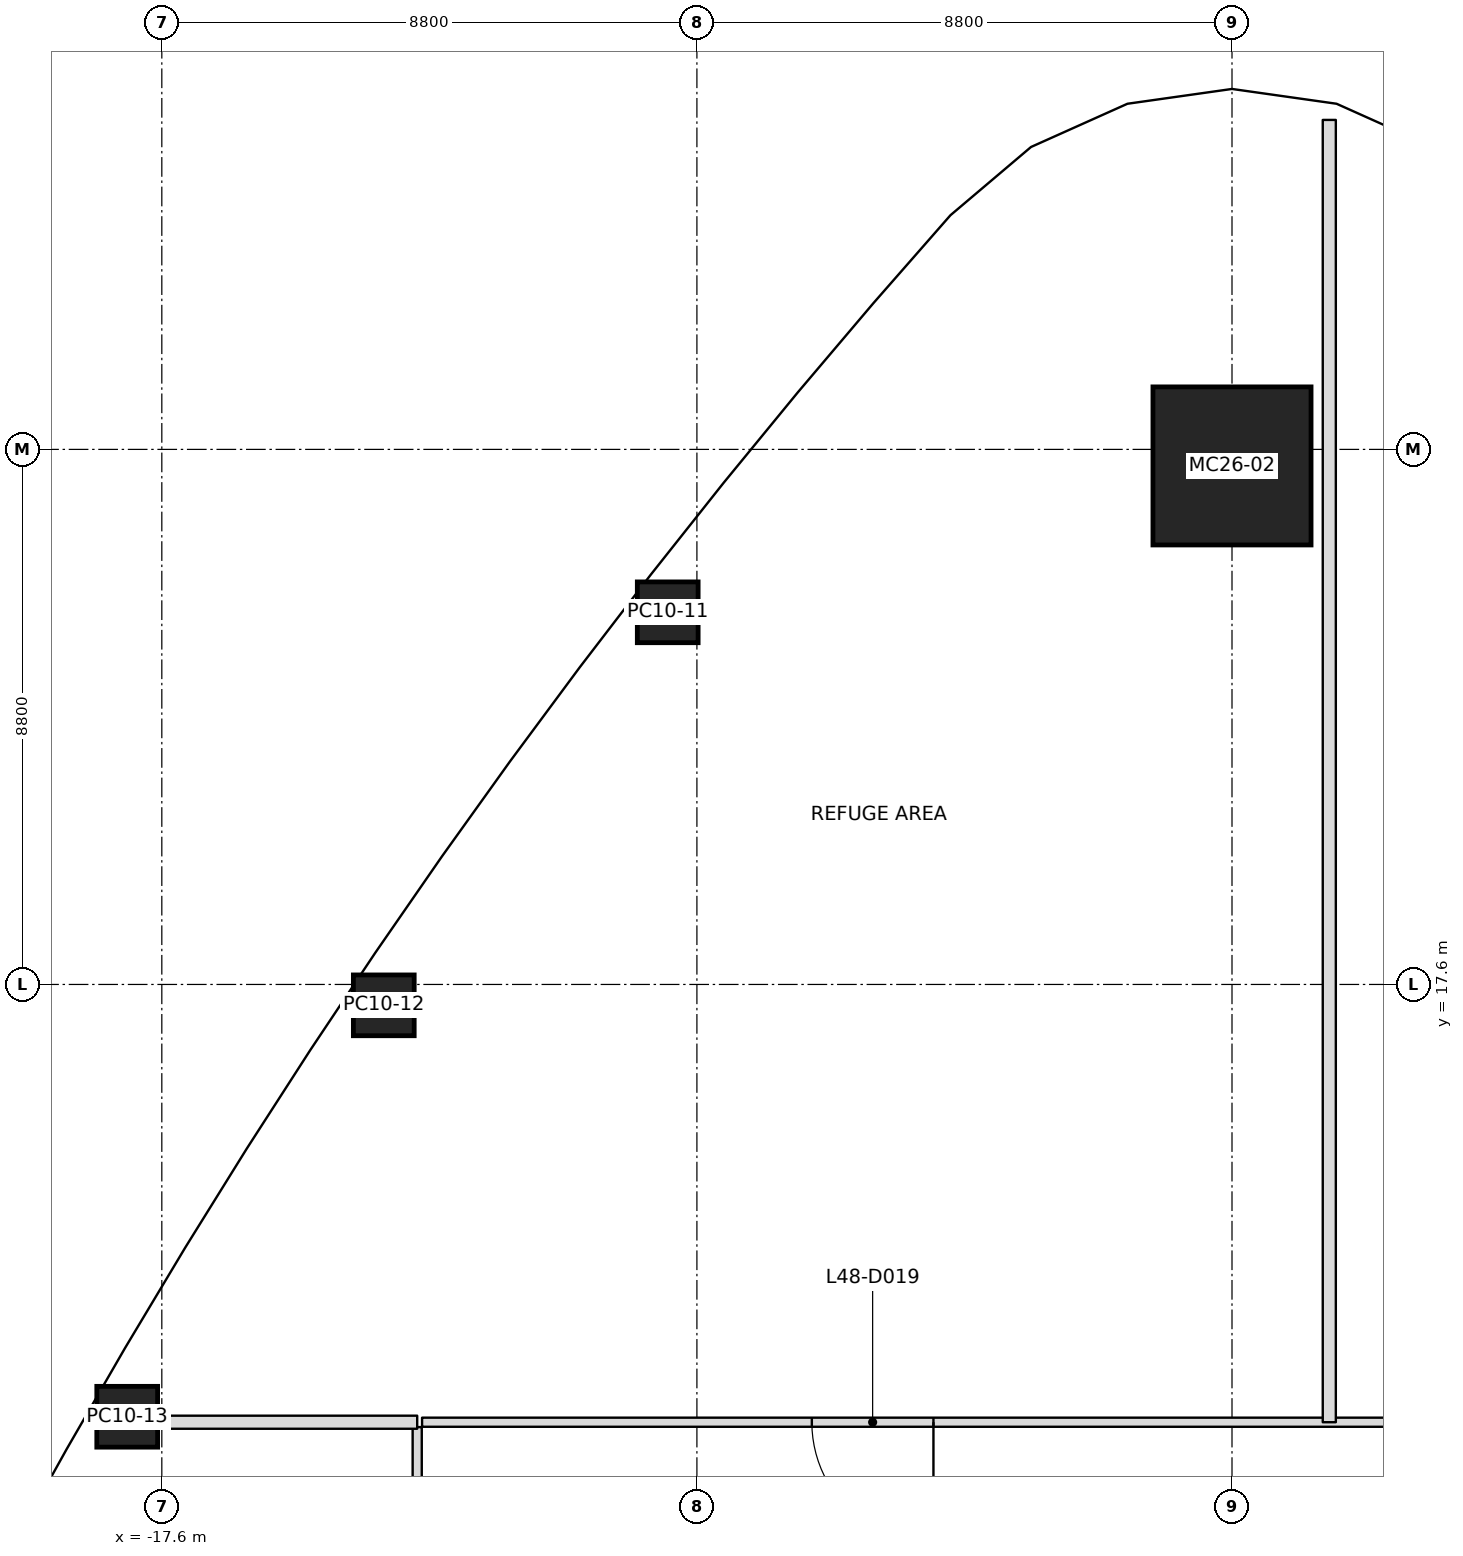
"""IFC4 building model, lengths in metres.
Left out: names, types, materials, properties, quantities, classifications, styles, units other than length and angle.
Written with IfcOpenShell. Run it as: python <this file> out.ifc"""

import sys

from ifc_helpers import new_model, si_unit, direction, frame, frame_2d, origin, origin_2d, place, context, subcontext, project, spatial, rectangle, extrude, clip, halfspace, element, fill, save


model = new_model("IFC4")
c1 = context("Model", 3, precision=1e-05, world=origin(), true_north=direction((0.0, 1.0)))
c2 = subcontext(c1, "Body", "Model", "MODEL_VIEW")
j1 = project(units=[si_unit("LENGTHUNIT", "METRE"), si_unit("PLANEANGLEUNIT", "RADIAN")], contexts=[c1])
p1 = place(None, origin())
s1 = spatial("IfcSite", under=j1, at=p1, CompositionType="ELEMENT")
p2 = place(p1, origin())
s2 = spatial("IfcBuilding", under=s1, at=p2, CompositionType="ELEMENT")
p3 = place(p2, frame((0.0, 0.0, 213.8)))
s3 = spatial("IfcBuildingStorey", under=s2, at=p3, CompositionType="ELEMENT", Elevation=213.8)
p4 = place(p3, frame((0.0, 26.128, 0.0), z_axis=(0.0, -0.021520080249, 0.999768416258), x_axis=(1.0, 0.0, 0.0)))
e1 = element("IfcColumn", 1, at=p4, inside=s3, PredefinedType="COLUMN", context=c2, shape_type="SweptSolid", body=[
    clip(clip(extrude(rectangle(XDim=2.6, YDim=2.6, at=origin_2d()), origin(), (0.0, 0.0, 1.0), 6.001), halfspace(frame((0.0, 0.0, 0.007)), True)), halfspace(frame((0.0, 0.0, 5.999)), False)),
])
p5 = place(p3, frame((-9.28, 23.721, 0.0), z_axis=(0.000162745295, -0.013629918492, 0.999907095102), x_axis=(0.612796713111, 0.790168535194, 0.010671194354)))
e2 = element("IfcColumn", 2, at=p5, inside=s3, PredefinedType="COLUMN", context=c2, shape_type="SweptSolid", body=[
    clip(clip(extrude(rectangle(XDim=1.0, YDim=1.0, at=origin_2d()), origin(), (0.0, 0.0, 1.0), 6.0), halfspace(frame((0.0, 0.0, 0.003)), True)), halfspace(frame((0.0, 0.0, 6.0)), False)),
])
p6 = place(p3, frame((-13.95, 17.257, 0.0), z_axis=(0.003539878893, -0.008829353101, 0.999954754867), x_axis=(0.557683667704, 0.830036296174, 0.00535479318)))
e3 = element("IfcColumn", 3, at=p6, inside=s3, PredefinedType="COLUMN", context=c2, shape_type="SweptSolid", body=[
    clip(clip(extrude(rectangle(XDim=1.0, YDim=1.0, at=origin_2d()), origin(), (0.0, 0.0, 1.0), 6.0), halfspace(frame((0.0, 0.0, 0.002)), True)), halfspace(frame((0.0, 0.0, 6.0)), False)),
])
p7 = place(p3, frame((-18.169, 10.49, 0.0), z_axis=(0.006591605453, -0.00382475872, 0.999970960558), x_axis=(0.499989137566, 0.866031674963, 1.6631558e-05)))
e4 = element("IfcColumn", 4, at=p7, inside=s3, PredefinedType="COLUMN", context=c2, shape_type="SweptSolid", body=[
    clip(clip(extrude(rectangle(XDim=1.0, YDim=1.0, at=origin_2d()), origin(), (0.0, 0.0, 1.0), 6.0), halfspace(frame((0.0, 0.0, 0.001)), True)), halfspace(frame((0.0, 0.0, 6.0)), False)),
])
p8 = place(p3, frame((-13.4, 10.4, 0.0), z_axis=(0.0, 0.0, 1.0), x_axis=(-1.0, 0.0, 0.0)))
e5 = element("IfcWall", 5, at=p8, inside=s3, PredefinedType="PARTITIONING", context=c2, shape_type="SweptSolid", body=[
    extrude(rectangle(XDim=5.186, YDim=0.215, at=frame_2d((2.593, 0.0))), origin(), (0.0, 0.0, 1.0), 5.45),
])
p9 = place(p3, frame((1.6, 10.4, 0.0), z_axis=(0.0, 0.0, 1.0), x_axis=(0.0, 1.0, 0.0)))
e6 = element("IfcWall", 6, at=p9, inside=s3, PredefinedType="PARTITIONING", context=c2, shape_type="SweptSolid", body=[
    extrude(rectangle(XDim=21.419, YDim=0.215, at=frame_2d((10.709, 0.0))), origin(), (0.0, 0.0, 1.0), 5.234),
])
p10 = place(p3, frame((-13.4, 10.32, 0.0), z_axis=(0.0, 0.0, 1.0), x_axis=(0.0, -1.0, 0.0)))
e7 = element("IfcWall", 7, at=p10, inside=s3, PredefinedType="PARTITIONING", context=c2, shape_type="SweptSolid", body=[
    extrude(rectangle(XDim=20.64, YDim=0.15, at=frame_2d((10.32, 0.0))), origin(), (0.0, 0.0, 1.0), 5.233),
])
p11 = place(p10, frame((3.32, 0.0, 0.0)))
e8 = element("IfcOpeningElement", 8, at=p11, cuts=e7, PredefinedType="OPENING", context=c2, shape_type="SweptSolid", body=[
    extrude(rectangle(XDim=1.0, YDim=2.4, at=frame_2d((0.5, 1.2))), frame((0.0, 0.075, 0.0), z_axis=(0.0, -1.0, 0.0), x_axis=(1.0, 0.0, 0.0)), (0.0, 0.0, 1.0), 0.15),
])
p12 = place(p10, frame((13.23, 0.0, 0.0)))
e9 = element("IfcOpeningElement", 9, at=p12, cuts=e7, PredefinedType="OPENING", context=c2, shape_type="SweptSolid", body=[
    extrude(rectangle(XDim=2.0, YDim=2.4, at=frame_2d((1.0, 1.2))), frame((0.0, 0.075, 0.0), z_axis=(0.0, -1.0, 0.0), x_axis=(1.0, 0.0, 0.0)), (0.0, 0.0, 1.0), 0.15),
])
p13 = place(p3, frame((13.32, 10.4, 0.0), z_axis=(0.0, 0.0, 1.0), x_axis=(-1.0, 0.0, 0.0)))
e10 = element("IfcWall", 10, at=p13, inside=s3, PredefinedType="PARTITIONING", context=c2, shape_type="SweptSolid", body=[
    extrude(rectangle(XDim=26.64, YDim=0.15, at=frame_2d((13.32, 0.0))), origin(), (0.0, 0.0, 1.0), 5.233),
])
p14 = place(p13, frame((4.81, 0.0, 0.0)))
e11 = element("IfcOpeningElement", 11, at=p14, cuts=e10, PredefinedType="OPENING", context=c2, shape_type="SweptSolid", body=[
    extrude(rectangle(XDim=2.0, YDim=2.4, at=frame_2d((1.0, 1.2))), frame((0.0, 0.075, 0.0), z_axis=(0.0, -1.0, 0.0), x_axis=(1.0, 0.0, 0.0)), (0.0, 0.0, 1.0), 0.15),
])
p15 = place(p13, frame((18.23, 0.0, 0.0)))
e12 = element("IfcOpeningElement", 12, at=p15, cuts=e10, PredefinedType="OPENING", context=c2, shape_type="SweptSolid", body=[
    extrude(rectangle(XDim=2.0, YDim=2.4, at=frame_2d((1.0, 1.2))), frame((0.0, 0.075, 0.0), z_axis=(0.0, -1.0, 0.0), x_axis=(1.0, 0.0, 0.0)), (0.0, 0.0, 1.0), 0.15),
])
p16 = place(p15, origin())
e13 = element("IfcDoor", 13, at=p16, inside=s3, OperationType="DOUBLE_DOOR_SINGLE_SWING", PredefinedType="DOOR", context=c2, shape_type="SweptSolid", body=[
    extrude(rectangle(XDim=2.0, YDim=2.4, at=frame_2d((1.0, 1.2))), frame((0.0, 0.025, 0.0), z_axis=(0.0, -1.0, 0.0), x_axis=(1.0, 0.0, 0.0)), (0.0, 0.0, 1.0), 0.05),
])
fill(e12, e13)
save(model, sys.argv[1])
